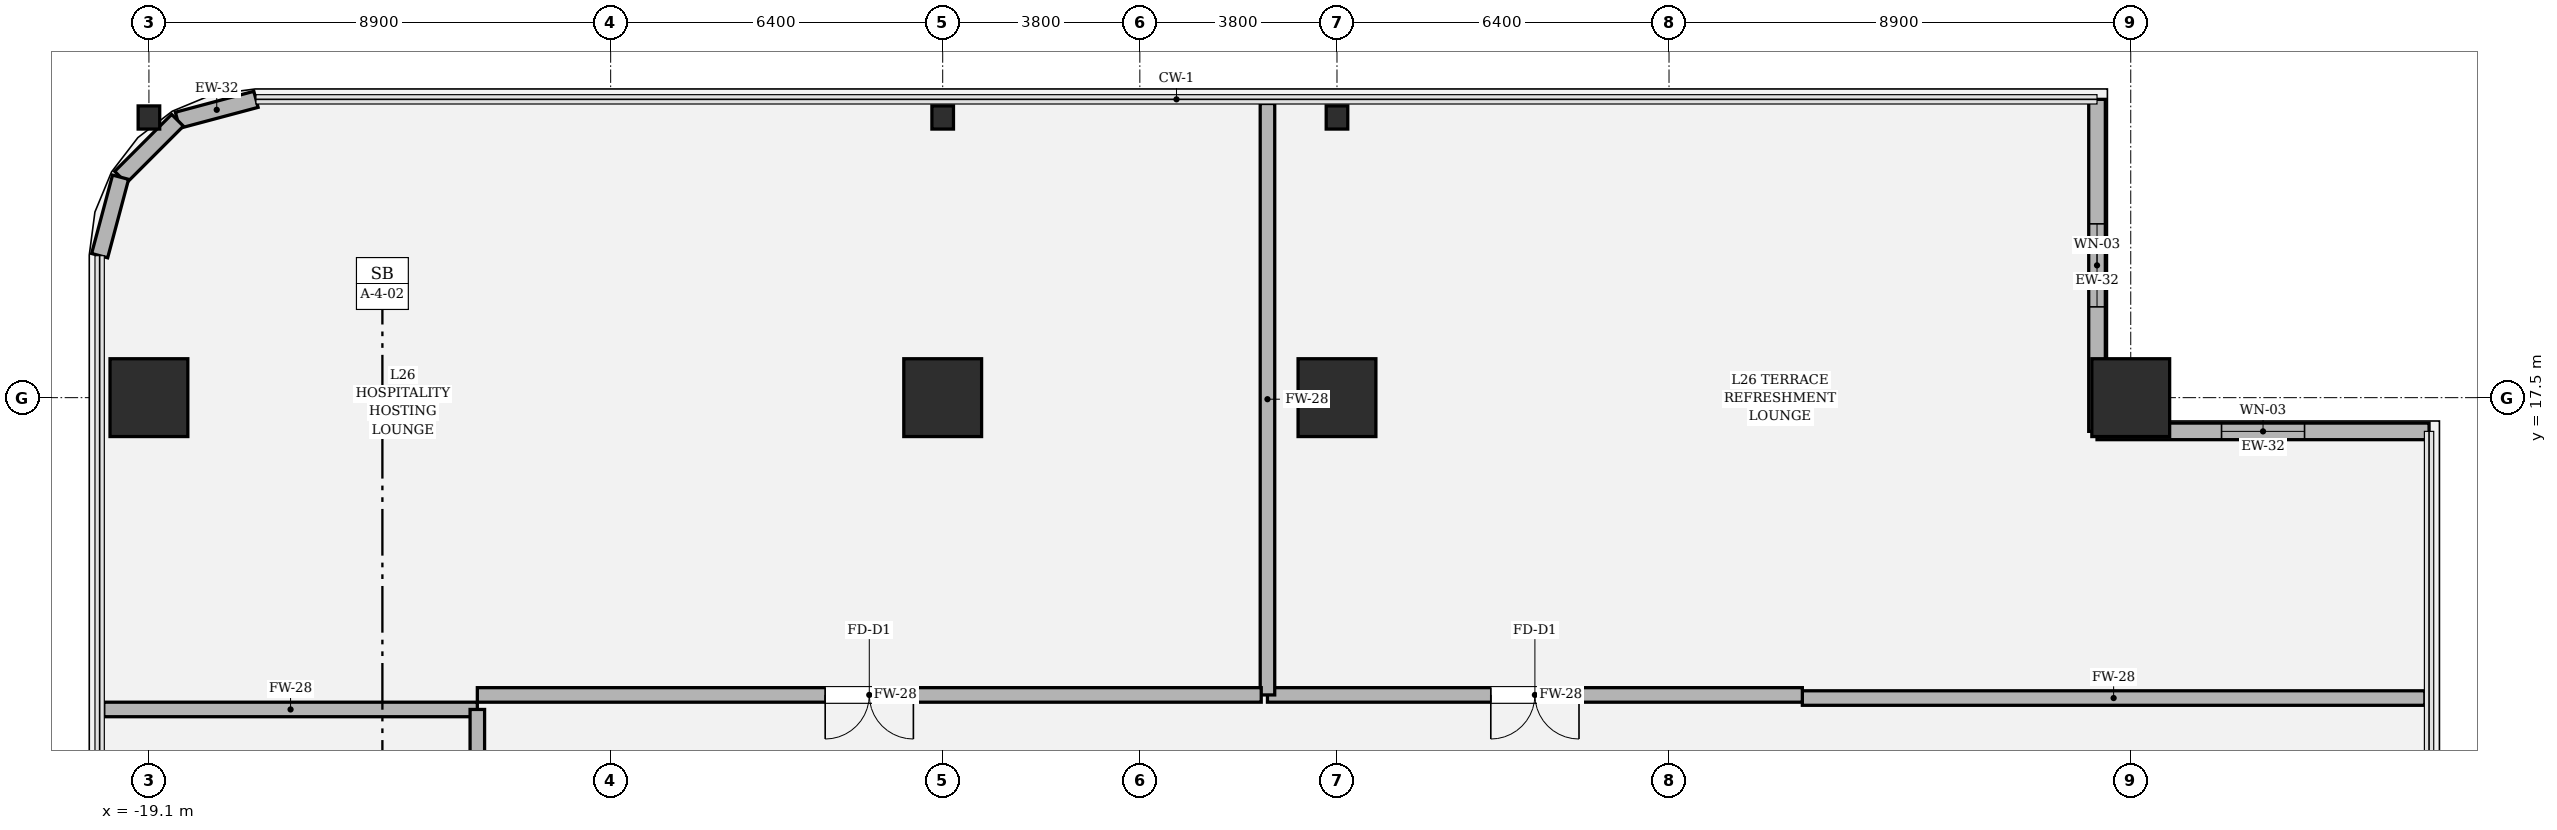
"""IFC4 building model, lengths in metres.
Left out: names, types, materials, properties, quantities, classifications, styles, units other than length and angle.
Written with IfcOpenShell. Run it as: python <this file> out.ifc"""

import sys

from ifc_helpers import new_model, si_unit, direction, frame, frame_2d, origin, origin_2d, place, context, subcontext, project, spatial, rectangle, hollow_rectangle, i_section, extrude, element, fill, save


model = new_model("IFC4")
c1 = context("Model", 3, precision=1e-05, world=origin(), true_north=direction((0.0, 1.0)))
c2 = subcontext(c1, "Body", "Model", "MODEL_VIEW")
j1 = project(units=[si_unit("LENGTHUNIT", "METRE"), si_unit("PLANEANGLEUNIT", "RADIAN")], contexts=[c1])
p1 = place(None, origin())
s1 = spatial("IfcSite", under=j1, at=p1, CompositionType="ELEMENT")
p2 = place(p1, origin())
s2 = spatial("IfcBuilding", under=s1, at=p2, CompositionType="ELEMENT")
p3 = place(p2, frame((0.0, 0.0, 113.25)))
s3 = spatial("IfcBuildingStorey", under=s2, at=p3, CompositionType="ELEMENT", Elevation=113.25)
for number, where, z_axis, x_axis in (
    (1, (19.1, 17.5, 0.0), (0.0, 0.0, 1.0), (1.0, 0.0, 0.0)),
    (2, (3.8, 17.5, 0.0), (0.0, 0.0, 1.0), (1.0, 0.0, 0.0)),
    (3, (-3.8, 17.5, 0.0), (0.0, 0.0, 1.0), (1.0, 0.0, 0.0)),
    (4, (-19.1, 17.5, 0.0), (0.0, 0.0, 1.0), (1.0, 0.0, 0.0)),
):
    element("IfcColumn", number, at=place(p3, frame(where, z_axis=z_axis, x_axis=x_axis)), inside=s3, PredefinedType="COLUMN", context=c2, shape_type="SweptSolid", body=[
        extrude(hollow_rectangle(XDim=1.5, YDim=1.5, WallThickness=0.045, at=origin_2d()), origin(), (0.0, 0.0, 1.0), 4.05),
    ])
for number, where, z_axis, x_axis in (
    (5, (-19.1, 22.9, 0.0), (0.0, 0.0, 1.0), (1.0, 0.0, 0.0)),
    (6, (-3.8, 22.9, 0.0), (0.0, 0.0, 1.0), (1.0, 0.0, 0.0)),
    (7, (3.8, 22.9, 0.0), (0.0, 0.0, 1.0), (1.0, 0.0, 0.0)),
):
    element("IfcColumn", number, at=place(p3, frame(where, z_axis=z_axis, x_axis=x_axis)), inside=s3, PredefinedType="COLUMN", context=c2, shape_type="SweptSolid", body=[
        extrude(i_section(OverallWidth=0.416, OverallDepth=0.446, WebThickness=0.039, FlangeThickness=0.062, FilletRadius=0.018, at=origin_2d()), origin(), (0.0, 0.0, 1.0), 4.048),
    ])
p4 = place(p3, frame((24.85, 16.85, 0.0), z_axis=(0.0, 0.0, 1.0), x_axis=(-1.0, 0.0, 0.0)))
e8 = element("IfcWall", 8, at=p4, inside=s3, PredefinedType="SOLIDWALL", context=c2, shape_type="SweptSolid", body=[
    extrude(rectangle(XDim=6.4, YDim=0.32, at=frame_2d((3.2, 0.0))), origin(), (0.0, 0.0, 1.0), 3.104),
])
p5 = place(p4, frame((2.4, 0.0, 0.464)))
e9 = element("IfcOpeningElement", 9, at=p5, cuts=e8, PredefinedType="OPENING", context=c2, shape_type="SweptSolid", body=[
    extrude(rectangle(XDim=1.6, YDim=2.4, at=frame_2d((0.8, 1.2))), frame((0.0, 0.17, 0.0), z_axis=(0.0, -1.0, 0.0), x_axis=(1.0, 0.0, 0.0)), (0.0, 0.0, 1.0), 0.34),
])
p6 = place(p3, frame((18.45, 16.85, 0.0), z_axis=(0.0, 0.0, 1.0), x_axis=(0.0, 1.0, 0.0)))
e10 = element("IfcWall", 10, at=p6, inside=s3, PredefinedType="SOLIDWALL", context=c2, shape_type="SweptSolid", body=[
    extrude(rectangle(XDim=6.4, YDim=0.32, at=frame_2d((3.2, 0.0))), origin(), (0.0, 0.0, 1.0), 3.104),
])
p7 = place(p6, frame((2.4, 0.0, 0.464)))
e11 = element("IfcOpeningElement", 11, at=p7, cuts=e10, PredefinedType="OPENING", context=c2, shape_type="SweptSolid", body=[
    extrude(rectangle(XDim=1.6, YDim=2.4, at=frame_2d((0.8, 1.2))), frame((0.0, 0.17, 0.0), z_axis=(0.0, -1.0, 0.0), x_axis=(1.0, 0.0, 0.0)), (0.0, 0.0, 1.0), 0.34),
])
p8 = place(p3, frame((-17.037, 23.25, 0.0), z_axis=(0.0, 0.0, 1.0), x_axis=(-0.966224582397, -0.257701486942, 0.0)))
e12 = element("IfcWall", 12, at=p8, inside=s3, PredefinedType="SOLIDWALL", context=c2, shape_type="SweptSolid", body=[
    extrude(rectangle(XDim=1.565, YDim=0.32, at=frame_2d((0.783, 0.0))), origin(), (0.0, 0.0, 1.0), 2.524),
])
p9 = place(p3, frame((-18.549, 22.847, 0.0), z_axis=(0.0, 0.0, 1.0), x_axis=(-0.707028130747, -0.707185422879, 0.0)))
e13 = element("IfcWall", 13, at=p9, inside=s3, PredefinedType="SOLIDWALL", context=c2, shape_type="SweptSolid", body=[
    extrude(rectangle(XDim=1.552, YDim=0.32, at=frame_2d((0.776, 0.0))), origin(), (0.0, 0.0, 1.0), 2.484),
])
p10 = place(p3, frame((-19.646, 21.749, 0.0), z_axis=(0.0, 0.0, 1.0), x_axis=(-0.257847112249, -0.966185730957, 0.0)))
e14 = element("IfcWall", 14, at=p10, inside=s3, PredefinedType="SOLIDWALL", context=c2, shape_type="SweptSolid", body=[
    extrude(rectangle(XDim=1.565, YDim=0.32, at=frame_2d((0.783, 0.0))), origin(), (0.0, 0.0, 1.0), 3.81),
])
p11 = place(p3, frame((-19.97, 11.49, 0.0), z_axis=(0.0, 0.0, 1.0), x_axis=(1.0, 0.0, 0.0)))
e15 = element("IfcWall", 15, at=p11, inside=s3, PredefinedType="SOLIDWALL", context=c2, shape_type="SweptSolid", body=[
    extrude(rectangle(XDim=7.2, YDim=0.28, at=frame_2d((3.6, 0.0))), origin(), (0.0, 0.0, 1.0), 3.104),
])
p12 = place(p3, frame((-12.77, 11.49, 0.0), z_axis=(0.0, 0.0, 1.0), x_axis=(0.0, -1.0, 0.0)))
e16 = element("IfcWall", 16, at=p12, inside=s3, PredefinedType="SOLIDWALL", context=c2, shape_type="SweptSolid", body=[
    extrude(rectangle(XDim=10.14, YDim=0.28, at=frame_2d((5.07, 0.0))), origin(), (0.0, 0.0, 1.0), 3.104),
])
p13 = place(p12, frame((4.22, 0.0, 0.0)))
e17 = element("IfcOpeningElement", 17, at=p13, cuts=e16, PredefinedType="OPENING", context=c2, shape_type="SweptSolid", body=[
    extrude(rectangle(XDim=1.7, YDim=2.3, at=frame_2d((0.85, 1.15))), frame((0.0, 0.15, 0.0), z_axis=(0.0, -1.0, 0.0), x_axis=(1.0, 0.0, 0.0)), (0.0, 0.0, 1.0), 0.3),
])
p14 = place(p3, frame((24.77, 11.71, 0.0), z_axis=(0.0, 0.0, 1.0), x_axis=(-1.0, 0.0, 0.0)))
e18 = element("IfcWall", 18, at=p14, inside=s3, PredefinedType="SOLIDWALL", context=c2, shape_type="SweptSolid", body=[
    extrude(rectangle(XDim=12.0, YDim=0.28, at=frame_2d((6.0, 0.0))), origin(), (0.0, 0.0, 1.0), 3.104),
])
p15 = place(p3, frame((12.77, 11.77, 0.0), z_axis=(0.0, 0.0, 1.0), x_axis=(-1.0, 0.0, 0.0)))
e19 = element("IfcWall", 19, at=p15, inside=s3, PredefinedType="SOLIDWALL", context=c2, shape_type="SweptSolid", body=[
    extrude(rectangle(XDim=10.31, YDim=0.28, at=frame_2d((5.155, 0.0))), origin(), (0.0, 0.0, 1.0), 3.104),
])
p16 = place(p15, frame((4.305, 0.0, 0.0)))
e20 = element("IfcOpeningElement", 20, at=p16, cuts=e19, PredefinedType="OPENING", context=c2, shape_type="SweptSolid", body=[
    extrude(rectangle(XDim=1.7, YDim=2.3, at=frame_2d((0.85, 1.15))), frame((0.0, 0.15, 0.0), z_axis=(0.0, -1.0, 0.0), x_axis=(1.0, 0.0, 0.0)), (0.0, 0.0, 1.0), 0.3),
])
p17 = place(p3, frame((2.46, 11.77, 0.0), z_axis=(0.0, 0.0, 1.0), x_axis=(0.0, 1.0, 0.0)))
e21 = element("IfcWall", 21, at=p17, inside=s3, PredefinedType="SOLIDWALL", context=c2, shape_type="SweptSolid", body=[
    extrude(rectangle(XDim=11.4, YDim=0.28, at=frame_2d((5.7, 0.0))), origin(), (0.0, 0.0, 1.0), 2.524),
])
p18 = place(p3, frame((2.34, 11.77, 0.0), z_axis=(0.0, 0.0, 1.0), x_axis=(-1.0, 0.0, 0.0)))
e22 = element("IfcWall", 22, at=p18, inside=s3, PredefinedType="SOLIDWALL", context=c2, shape_type="SweptSolid", body=[
    extrude(rectangle(XDim=15.11, YDim=0.28, at=frame_2d((7.555, 0.0))), origin(), (0.0, 0.0, 1.0), 3.104),
])
p19 = place(p18, frame((6.705, 0.0, 0.0)))
e23 = element("IfcOpeningElement", 23, at=p19, cuts=e22, PredefinedType="OPENING", context=c2, shape_type="SweptSolid", body=[
    extrude(rectangle(XDim=1.7, YDim=2.3, at=frame_2d((0.85, 1.15))), frame((0.0, 0.15, 0.0), z_axis=(0.0, -1.0, 0.0), x_axis=(1.0, 0.0, 0.0)), (0.0, 0.0, 1.0), 0.3),
])
p20 = place(p5, origin())
e24 = element("IfcWindow", 24, at=p20, inside=s3, PartitioningType="SINGLE_PANEL", PredefinedType="WINDOW", context=c2, shape_type="SweptSolid", body=[
    extrude(rectangle(XDim=1.6, YDim=2.4, at=frame_2d((0.8, 1.2))), frame((0.0, 0.03, 0.0), z_axis=(0.0, -1.0, 0.0), x_axis=(1.0, 0.0, 0.0)), (0.0, 0.0, 1.0), 0.06),
])
fill(e9, e24)
p21 = place(p7, origin())
e25 = element("IfcWindow", 25, at=p21, inside=s3, PartitioningType="SINGLE_PANEL", PredefinedType="WINDOW", context=c2, shape_type="SweptSolid", body=[
    extrude(rectangle(XDim=1.6, YDim=2.4, at=frame_2d((0.8, 1.2))), frame((0.0, 0.03, 0.0), z_axis=(0.0, -1.0, 0.0), x_axis=(1.0, 0.0, 0.0)), (0.0, 0.0, 1.0), 0.06),
])
fill(e11, e25)
p22 = place(p16, origin())
e26 = element("IfcDoor", 26, at=p22, inside=s3, OperationType="DOUBLE_DOOR_SINGLE_SWING", PredefinedType="DOOR", context=c2, shape_type="SweptSolid", body=[
    extrude(rectangle(XDim=1.7, YDim=2.3, at=frame_2d((0.85, 1.15))), frame((0.0, 0.025, 0.0), z_axis=(0.0, -1.0, 0.0), x_axis=(1.0, 0.0, 0.0)), (0.0, 0.0, 1.0), 0.05),
])
fill(e20, e26)
p23 = place(p19, origin())
e27 = element("IfcDoor", 27, at=p23, inside=s3, OperationType="DOUBLE_DOOR_SINGLE_SWING", PredefinedType="DOOR", context=c2, shape_type="SweptSolid", body=[
    extrude(rectangle(XDim=1.7, YDim=2.3, at=frame_2d((0.85, 1.15))), frame((0.0, 0.025, 0.0), z_axis=(0.0, -1.0, 0.0), x_axis=(1.0, 0.0, 0.0)), (0.0, 0.0, 1.0), 0.05),
])
fill(e23, e27)
save(model, sys.argv[1])
